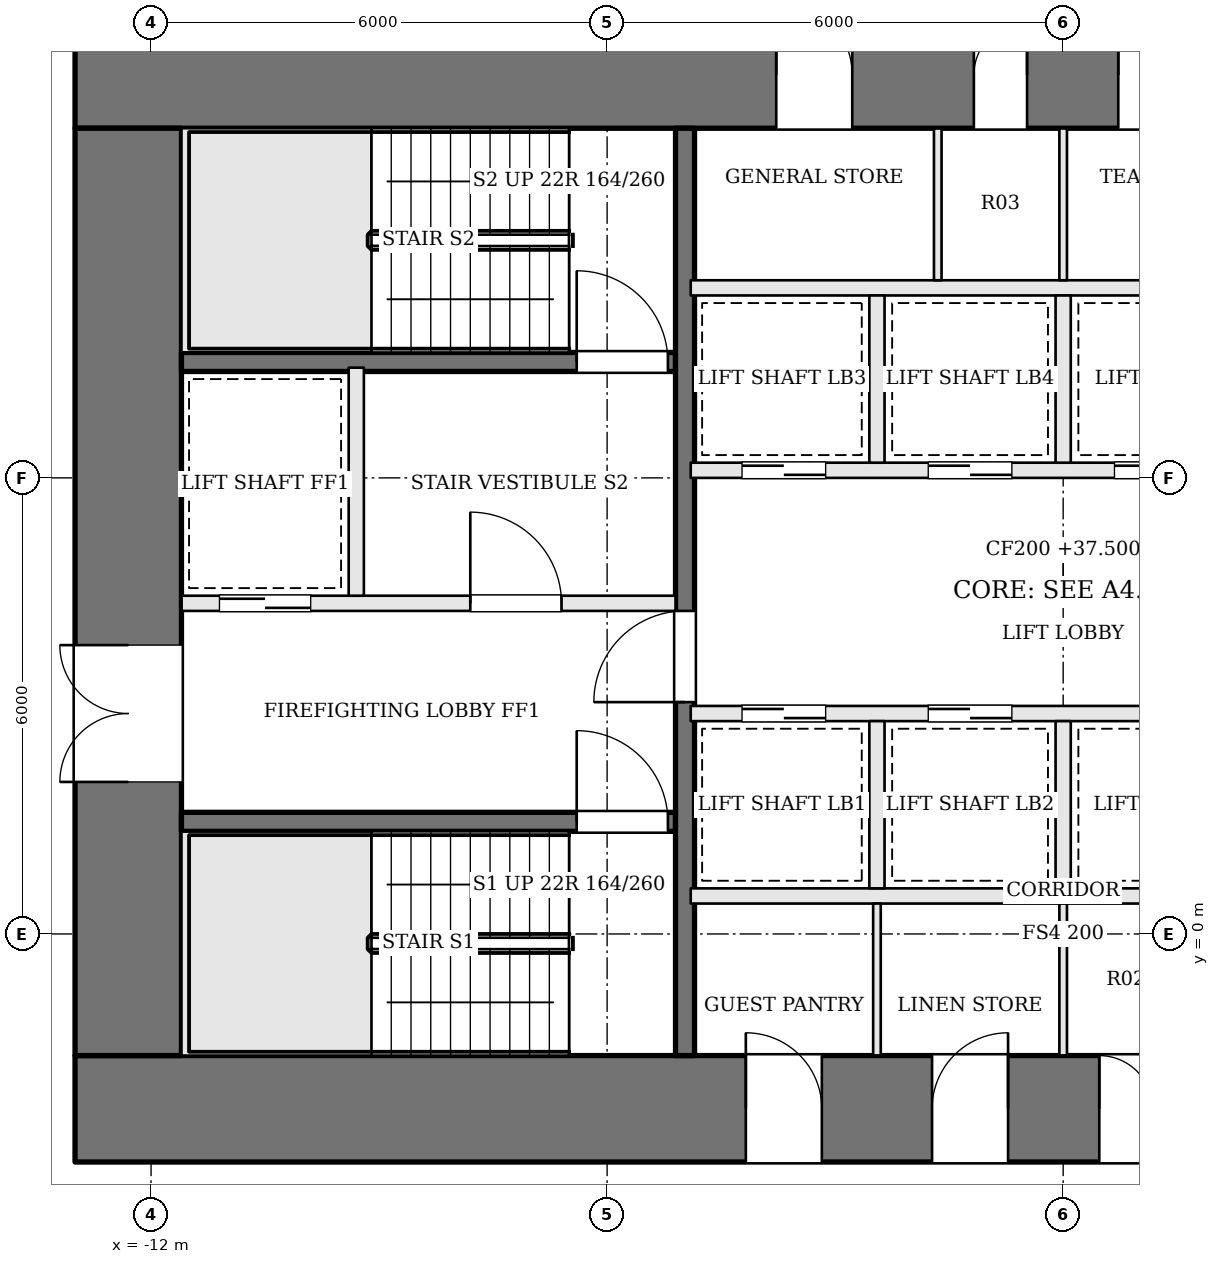
"""IFC4 building model, lengths in metres.
Left out: names, types, materials, properties, quantities, classifications, styles, units other than length and angle.
Written with IfcOpenShell. Run it as: python <this file> out.ifc"""

import sys

from ifc_helpers import new_model, si_unit, direction, frame, frame_2d, origin, place, context, subcontext, project, spatial, rectangle, extrude, element, fill, save


model = new_model("IFC4")
c1 = context("Model", 3, precision=1e-05, world=origin(), true_north=direction((0.0, 1.0)))
c2 = subcontext(c1, "Body", "Model", "MODEL_VIEW")
j1 = project(units=[si_unit("LENGTHUNIT", "METRE"), si_unit("PLANEANGLEUNIT", "RADIAN")], contexts=[c1])
p1 = place(None, origin())
s1 = spatial("IfcSite", under=j1, at=p1, CompositionType="ELEMENT")
p2 = place(p1, origin())
s2 = spatial("IfcBuilding", under=s1, at=p2, CompositionType="ELEMENT")
p3 = place(p2, frame((0.0, 0.0, 37.5)))
s3 = spatial("IfcBuildingStorey", under=s2, at=p3, CompositionType="ELEMENT", Elevation=37.5)
p4 = place(p3, frame((-13.0, 11.3, 0.0), z_axis=(0.0, 0.0, 1.0), x_axis=(1.0, 0.0, 0.0)))
e1 = element("IfcWall", 1, at=p4, inside=s3, PredefinedType="SHEAR", context=c2, shape_type="SweptSolid", body=[
    extrude(rectangle(XDim=26.0, YDim=1.4, at=frame_2d((13.0, 0.0))), origin(), (0.0, 0.0, 1.0), 3.6),
])
p5 = place(p4, frame((9.225, 0.0, 0.0)))
e2 = element("IfcOpeningElement", 2, at=p5, cuts=e1, PredefinedType="OPENING", context=c2, shape_type="SweptSolid", body=[
    extrude(rectangle(XDim=1.0, YDim=2.1, at=frame_2d((0.5, 1.05))), frame((0.0, 0.71, 0.0), z_axis=(0.0, -1.0, 0.0), x_axis=(1.0, 0.0, 0.0)), (0.0, 0.0, 1.0), 1.42),
])
p6 = place(p4, frame((11.825, 0.0, 0.0)))
e3 = element("IfcOpeningElement", 3, at=p6, cuts=e1, PredefinedType="OPENING", context=c2, shape_type="SweptSolid", body=[
    extrude(rectangle(XDim=0.7, YDim=2.1, at=frame_2d((0.35, 1.05))), frame((0.0, 0.71, 0.0), z_axis=(0.0, -1.0, 0.0), x_axis=(1.0, 0.0, 0.0)), (0.0, 0.0, 1.0), 1.42),
])
p7 = place(p4, frame((13.725, 0.0, 0.0)))
e4 = element("IfcOpeningElement", 4, at=p7, cuts=e1, PredefinedType="OPENING", context=c2, shape_type="SweptSolid", body=[
    extrude(rectangle(XDim=1.0, YDim=2.1, at=frame_2d((0.5, 1.05))), frame((0.0, 0.71, 0.0), z_axis=(0.0, -1.0, 0.0), x_axis=(1.0, 0.0, 0.0)), (0.0, 0.0, 1.0), 1.42),
])
p8 = place(p4, frame((16.225, 0.0, 0.0)))
e5 = element("IfcOpeningElement", 5, at=p8, cuts=e1, PredefinedType="OPENING", context=c2, shape_type="SweptSolid", body=[
    extrude(rectangle(XDim=0.9, YDim=2.1, at=frame_2d((0.45, 1.05))), frame((0.0, 0.71, 0.0), z_axis=(0.0, -1.0, 0.0), x_axis=(1.0, 0.0, 0.0)), (0.0, 0.0, 1.0), 1.42),
])
p9 = place(p3, frame((-13.0, -2.3, 0.0), z_axis=(0.0, 0.0, 1.0), x_axis=(1.0, 0.0, 0.0)))
e6 = element("IfcWall", 6, at=p9, inside=s3, PredefinedType="SHEAR", context=c2, shape_type="SweptSolid", body=[
    extrude(rectangle(XDim=26.0, YDim=1.4, at=frame_2d((13.0, 0.0))), origin(), (0.0, 0.0, 1.0), 3.6),
])
p10 = place(p9, frame((8.825, 0.0, 0.0)))
e7 = element("IfcOpeningElement", 7, at=p10, cuts=e6, PredefinedType="OPENING", context=c2, shape_type="SweptSolid", body=[
    extrude(rectangle(XDim=1.0, YDim=2.1, at=frame_2d((0.5, 1.05))), frame((0.0, 0.71, 0.0), z_axis=(0.0, -1.0, 0.0), x_axis=(1.0, 0.0, 0.0)), (0.0, 0.0, 1.0), 1.42),
])
p11 = place(p9, frame((11.275, 0.0, 0.0)))
e8 = element("IfcOpeningElement", 8, at=p11, cuts=e6, PredefinedType="OPENING", context=c2, shape_type="SweptSolid", body=[
    extrude(rectangle(XDim=1.0, YDim=2.1, at=frame_2d((0.5, 1.05))), frame((0.0, 0.71, 0.0), z_axis=(0.0, -1.0, 0.0), x_axis=(1.0, 0.0, 0.0)), (0.0, 0.0, 1.0), 1.42),
])
p12 = place(p9, frame((13.475, 0.0, 0.0)))
e9 = element("IfcOpeningElement", 9, at=p12, cuts=e6, PredefinedType="OPENING", context=c2, shape_type="SweptSolid", body=[
    extrude(rectangle(XDim=0.7, YDim=2.1, at=frame_2d((0.35, 1.05))), frame((0.0, 0.71, 0.0), z_axis=(0.0, -1.0, 0.0), x_axis=(1.0, 0.0, 0.0)), (0.0, 0.0, 1.0), 1.42),
])
p13 = place(p9, frame((15.775, 0.0, 0.0)))
e10 = element("IfcOpeningElement", 10, at=p13, cuts=e6, PredefinedType="OPENING", context=c2, shape_type="SweptSolid", body=[
    extrude(rectangle(XDim=1.0, YDim=2.1, at=frame_2d((0.5, 1.05))), frame((0.0, 0.71, 0.0), z_axis=(0.0, -1.0, 0.0), x_axis=(1.0, 0.0, 0.0)), (0.0, 0.0, 1.0), 1.42),
])
p14 = place(p3, frame((-12.3, -1.6, 0.0), z_axis=(0.0, 0.0, 1.0), x_axis=(0.0, 1.0, 0.0)))
e11 = element("IfcWall", 11, at=p14, inside=s3, PredefinedType="SHEAR", context=c2, shape_type="SweptSolid", body=[
    extrude(rectangle(XDim=12.2, YDim=1.4, at=frame_2d((6.1, 0.0))), origin(), (0.0, 0.0, 1.0), 3.6),
])
p15 = place(p14, frame((3.6, 0.0, 0.0)))
e12 = element("IfcOpeningElement", 12, at=p15, cuts=e11, PredefinedType="OPENING", context=c2, shape_type="SweptSolid", body=[
    extrude(rectangle(XDim=1.8, YDim=2.1, at=frame_2d((0.9, 1.05))), frame((0.0, 0.71, 0.0), z_axis=(0.0, -1.0, 0.0), x_axis=(1.0, 0.0, 0.0)), (0.0, 0.0, 1.0), 1.42),
])
p16 = place(p3, frame((-11.6, 1.475, 0.0), z_axis=(0.0, 0.0, 1.0), x_axis=(1.0, 0.0, 0.0)))
e13 = element("IfcWall", 13, at=p16, inside=s3, PredefinedType="SOLIDWALL", context=c2, shape_type="SweptSolid", body=[
    extrude(rectangle(XDim=6.5, YDim=0.25, at=frame_2d((3.25, 0.0))), origin(), (0.0, 0.0, 1.0), 3.4),
])
p17 = place(p16, frame((5.2, 0.0, 0.0)))
e14 = element("IfcOpeningElement", 14, at=p17, cuts=e13, PredefinedType="OPENING", context=c2, shape_type="SweptSolid", body=[
    extrude(rectangle(XDim=1.2, YDim=2.1, at=frame_2d((0.6, 1.05))), frame((0.0, 0.135, 0.0), z_axis=(0.0, -1.0, 0.0), x_axis=(1.0, 0.0, 0.0)), (0.0, 0.0, 1.0), 0.27),
])
p18 = place(p3, frame((-11.6, 4.35, 0.0), z_axis=(0.0, 0.0, 1.0), x_axis=(1.0, 0.0, 0.0)))
e15 = element("IfcWall", 15, at=p18, inside=s3, PredefinedType="SOLIDWALL", context=c2, shape_type="SweptSolid", body=[
    extrude(rectangle(XDim=6.5, YDim=0.2, at=frame_2d((3.25, 0.0))), origin(), (0.0, 0.0, 1.0), 3.4),
])
p19 = place(p18, frame((3.8, 0.0, 0.0)))
e16 = element("IfcOpeningElement", 16, at=p19, cuts=e15, PredefinedType="OPENING", context=c2, shape_type="SweptSolid", body=[
    extrude(rectangle(XDim=1.2, YDim=2.1, at=frame_2d((0.6, 1.05))), frame((0.0, 0.11, 0.0), z_axis=(0.0, -1.0, 0.0), x_axis=(1.0, 0.0, 0.0)), (0.0, 0.0, 1.0), 0.22),
])
p20 = place(p18, frame((0.5, 0.0, 0.0)))
e17 = element("IfcOpeningElement", 17, at=p20, cuts=e15, PredefinedType="OPENING", context=c2, shape_type="SweptSolid", body=[
    extrude(rectangle(XDim=1.2, YDim=2.1, at=frame_2d((0.6, 1.05))), frame((0.0, 0.11, 0.0), z_axis=(0.0, -1.0, 0.0), x_axis=(1.0, 0.0, 0.0)), (0.0, 0.0, 1.0), 0.22),
])
p21 = place(p3, frame((-11.6, 7.525, 0.0), z_axis=(0.0, 0.0, 1.0), x_axis=(1.0, 0.0, 0.0)))
e18 = element("IfcWall", 18, at=p21, inside=s3, PredefinedType="SOLIDWALL", context=c2, shape_type="SweptSolid", body=[
    extrude(rectangle(XDim=6.5, YDim=0.25, at=frame_2d((3.25, 0.0))), origin(), (0.0, 0.0, 1.0), 3.4),
])
p22 = place(p21, frame((5.2, 0.0, 0.0)))
e19 = element("IfcOpeningElement", 19, at=p22, cuts=e18, PredefinedType="OPENING", context=c2, shape_type="SweptSolid", body=[
    extrude(rectangle(XDim=1.2, YDim=2.1, at=frame_2d((0.6, 1.05))), frame((0.0, 0.135, 0.0), z_axis=(0.0, -1.0, 0.0), x_axis=(1.0, 0.0, 0.0)), (0.0, 0.0, 1.0), 0.27),
])
p23 = place(p3, frame((-9.3, 4.45, 0.0), z_axis=(0.0, 0.0, 1.0), x_axis=(0.0, 1.0, 0.0)))
e20 = element("IfcWall", 20, at=p23, inside=s3, PredefinedType="SOLIDWALL", context=c2, shape_type="SweptSolid", body=[
    extrude(rectangle(XDim=3.0, YDim=0.2, at=frame_2d((1.5, 0.0))), origin(), (0.0, 0.0, 1.0), 3.4),
])
p24 = place(p3, frame((-4.975, -1.6, 0.0), z_axis=(0.0, 0.0, 1.0), x_axis=(0.0, 1.0, 0.0)))
e21 = element("IfcWall", 21, at=p24, inside=s3, PredefinedType="SOLIDWALL", context=c2, shape_type="SweptSolid", body=[
    extrude(rectangle(XDim=12.2, YDim=0.25, at=frame_2d((6.1, 0.0))), origin(), (0.0, 0.0, 1.0), 3.4),
])
p25 = place(p24, frame((4.65, 0.0, 0.0)))
e22 = element("IfcOpeningElement", 22, at=p25, cuts=e21, PredefinedType="OPENING", context=c2, shape_type="SweptSolid", body=[
    extrude(rectangle(XDim=1.2, YDim=2.1, at=frame_2d((0.6, 1.05))), frame((0.0, 0.135, 0.0), z_axis=(0.0, -1.0, 0.0), x_axis=(1.0, 0.0, 0.0)), (0.0, 0.0, 1.0), 0.27),
])
p26 = place(p3, frame((-4.9, 0.5, 0.0), z_axis=(0.0, 0.0, 1.0), x_axis=(1.0, 0.0, 0.0)))
e23 = element("IfcWall", 23, at=p26, inside=s3, PredefinedType="SOLIDWALL", context=c2, shape_type="SweptSolid", body=[
    extrude(rectangle(XDim=9.8, YDim=0.2, at=frame_2d((4.9, 0.0))), origin(), (0.0, 0.0, 1.0), 3.4),
])
p27 = place(p3, frame((-4.9, 2.9, 0.0), z_axis=(0.0, 0.0, 1.0), x_axis=(1.0, 0.0, 0.0)))
e24 = element("IfcWall", 24, at=p27, inside=s3, PredefinedType="SOLIDWALL", context=c2, shape_type="SweptSolid", body=[
    extrude(rectangle(XDim=9.8, YDim=0.2, at=frame_2d((4.9, 0.0))), origin(), (0.0, 0.0, 1.0), 3.4),
])
p28 = place(p27, frame((0.675, 0.0, 0.0)))
e25 = element("IfcOpeningElement", 25, at=p28, cuts=e24, PredefinedType="OPENING", context=c2, shape_type="SweptSolid", body=[
    extrude(rectangle(XDim=1.1, YDim=2.1, at=frame_2d((0.55, 1.05))), frame((0.0, 0.11, 0.0), z_axis=(0.0, -1.0, 0.0), x_axis=(1.0, 0.0, 0.0)), (0.0, 0.0, 1.0), 0.22),
])
p29 = place(p27, frame((3.125, 0.0, 0.0)))
e26 = element("IfcOpeningElement", 26, at=p29, cuts=e24, PredefinedType="OPENING", context=c2, shape_type="SweptSolid", body=[
    extrude(rectangle(XDim=1.1, YDim=2.1, at=frame_2d((0.55, 1.05))), frame((0.0, 0.11, 0.0), z_axis=(0.0, -1.0, 0.0), x_axis=(1.0, 0.0, 0.0)), (0.0, 0.0, 1.0), 0.22),
])
p30 = place(p3, frame((-4.9, 6.1, 0.0), z_axis=(0.0, 0.0, 1.0), x_axis=(1.0, 0.0, 0.0)))
e27 = element("IfcWall", 27, at=p30, inside=s3, PredefinedType="SOLIDWALL", context=c2, shape_type="SweptSolid", body=[
    extrude(rectangle(XDim=9.8, YDim=0.2, at=frame_2d((4.9, 0.0))), origin(), (0.0, 0.0, 1.0), 3.4),
])
p31 = place(p30, frame((0.675, 0.0, 0.0)))
e28 = element("IfcOpeningElement", 28, at=p31, cuts=e27, PredefinedType="OPENING", context=c2, shape_type="SweptSolid", body=[
    extrude(rectangle(XDim=1.1, YDim=2.1, at=frame_2d((0.55, 1.05))), frame((0.0, 0.11, 0.0), z_axis=(0.0, -1.0, 0.0), x_axis=(1.0, 0.0, 0.0)), (0.0, 0.0, 1.0), 0.22),
])
p32 = place(p30, frame((3.125, 0.0, 0.0)))
e29 = element("IfcOpeningElement", 29, at=p32, cuts=e27, PredefinedType="OPENING", context=c2, shape_type="SweptSolid", body=[
    extrude(rectangle(XDim=1.1, YDim=2.1, at=frame_2d((0.55, 1.05))), frame((0.0, 0.11, 0.0), z_axis=(0.0, -1.0, 0.0), x_axis=(1.0, 0.0, 0.0)), (0.0, 0.0, 1.0), 0.22),
])
p33 = place(p30, frame((5.575, 0.0, 0.0)))
e30 = element("IfcOpeningElement", 30, at=p33, cuts=e27, PredefinedType="OPENING", context=c2, shape_type="SweptSolid", body=[
    extrude(rectangle(XDim=1.1, YDim=2.1, at=frame_2d((0.55, 1.05))), frame((0.0, 0.11, 0.0), z_axis=(0.0, -1.0, 0.0), x_axis=(1.0, 0.0, 0.0)), (0.0, 0.0, 1.0), 0.22),
])
p34 = place(p30, frame((8.025, 0.0, 0.0)))
e31 = element("IfcOpeningElement", 31, at=p34, cuts=e27, PredefinedType="OPENING", context=c2, shape_type="SweptSolid", body=[
    extrude(rectangle(XDim=1.1, YDim=2.1, at=frame_2d((0.55, 1.05))), frame((0.0, 0.11, 0.0), z_axis=(0.0, -1.0, 0.0), x_axis=(1.0, 0.0, 0.0)), (0.0, 0.0, 1.0), 0.22),
])
p35 = place(p3, frame((-4.9, 8.5, 0.0), z_axis=(0.0, 0.0, 1.0), x_axis=(1.0, 0.0, 0.0)))
e32 = element("IfcWall", 32, at=p35, inside=s3, PredefinedType="SOLIDWALL", context=c2, shape_type="SweptSolid", body=[
    extrude(rectangle(XDim=9.8, YDim=0.2, at=frame_2d((4.9, 0.0))), origin(), (0.0, 0.0, 1.0), 3.4),
])
for number, where, z_axis, x_axis in (
    (33, (-2.45, 0.6, 0.0), (0.0, 0.0, 1.0), (0.0, 1.0, 0.0)),
    (34, (0.0, 0.6, 0.0), (0.0, 0.0, 1.0), (0.0, 1.0, 0.0)),
    (35, (-2.45, 6.2, 0.0), (0.0, 0.0, 1.0), (0.0, 1.0, 0.0)),
    (36, (0.0, 6.2, 0.0), (0.0, 0.0, 1.0), (0.0, 1.0, 0.0)),
):
    element("IfcWall", number, at=place(p3, frame(where, z_axis=z_axis, x_axis=x_axis)), inside=s3, PredefinedType="SOLIDWALL", context=c2, shape_type="SweptSolid", body=[
        extrude(rectangle(XDim=2.2, YDim=0.2, at=frame_2d((1.1, 0.0))), origin(), (0.0, 0.0, 1.0), 3.4),
    ])
for number, where, z_axis, x_axis in (
    (37, (-2.45, -1.6, 0.0), (0.0, 0.0, 1.0), (0.0, 1.0, 0.0)),
    (38, (0.0, -1.6, 0.0), (0.0, 0.0, 1.0), (0.0, 1.0, 0.0)),
    (39, (-1.65, 8.6, 0.0), (0.0, 0.0, 1.0), (0.0, 1.0, 0.0)),
    (40, (0.0, 8.6, 0.0), (0.0, 0.0, 1.0), (0.0, 1.0, 0.0)),
):
    element("IfcWall", number, at=place(p3, frame(where, z_axis=z_axis, x_axis=x_axis)), inside=s3, PredefinedType="PARTITIONING", context=c2, shape_type="SweptSolid", body=[
        extrude(rectangle(XDim=2.0, YDim=0.1, at=frame_2d((1.0, 0.0))), origin(), (0.0, 0.0, 1.0), 3.4),
    ])
p36 = place(p15, origin())
e41 = element("IfcDoor", 41, at=p36, inside=s3, OperationType="DOUBLE_DOOR_SINGLE_SWING", PredefinedType="DOOR", context=c2, shape_type="SweptSolid", body=[
    extrude(rectangle(XDim=1.8, YDim=2.1, at=frame_2d((0.9, 1.05))), frame((0.0, 0.025, 0.0), z_axis=(0.0, -1.0, 0.0), x_axis=(1.0, 0.0, 0.0)), (0.0, 0.0, 1.0), 0.05),
])
fill(e12, e41)
p37 = place(p25, origin())
e42 = element("IfcDoor", 42, at=p37, inside=s3, OperationType="SINGLE_SWING_LEFT", PredefinedType="DOOR", context=c2, shape_type="SweptSolid", body=[
    extrude(rectangle(XDim=1.2, YDim=2.1, at=frame_2d((0.6, 1.05))), frame((0.0, 0.025, 0.0), z_axis=(0.0, -1.0, 0.0), x_axis=(1.0, 0.0, 0.0)), (0.0, 0.0, 1.0), 0.05),
])
fill(e22, e42)
p38 = place(p19, origin())
e43 = element("IfcDoor", 43, at=p38, inside=s3, OperationType="SINGLE_SWING_LEFT", PredefinedType="DOOR", context=c2, shape_type="SweptSolid", body=[
    extrude(rectangle(XDim=1.2, YDim=2.1, at=frame_2d((0.6, 1.05))), frame((0.0, 0.025, 0.0), z_axis=(0.0, -1.0, 0.0), x_axis=(1.0, 0.0, 0.0)), (0.0, 0.0, 1.0), 0.05),
])
fill(e16, e43)
p39 = place(p17, origin())
e44 = element("IfcDoor", 44, at=p39, inside=s3, OperationType="SINGLE_SWING_LEFT", PredefinedType="DOOR", context=c2, shape_type="SweptSolid", body=[
    extrude(rectangle(XDim=1.2, YDim=2.1, at=frame_2d((0.6, 1.05))), frame((0.0, 0.025, 0.0), z_axis=(0.0, -1.0, 0.0), x_axis=(1.0, 0.0, 0.0)), (0.0, 0.0, 1.0), 0.05),
])
fill(e14, e44)
p40 = place(p22, origin())
e45 = element("IfcDoor", 45, at=p40, inside=s3, OperationType="SINGLE_SWING_LEFT", PredefinedType="DOOR", context=c2, shape_type="SweptSolid", body=[
    extrude(rectangle(XDim=1.2, YDim=2.1, at=frame_2d((0.6, 1.05))), frame((0.0, 0.025, 0.0), z_axis=(0.0, -1.0, 0.0), x_axis=(1.0, 0.0, 0.0)), (0.0, 0.0, 1.0), 0.05),
])
fill(e19, e45)
p41 = place(p20, origin())
e46 = element("IfcDoor", 46, at=p41, inside=s3, OperationType="SLIDING_TO_RIGHT", PredefinedType="DOOR", context=c2, shape_type="SweptSolid", body=[
    extrude(rectangle(XDim=1.2, YDim=2.1, at=frame_2d((0.6, 1.05))), frame((0.0, 0.025, 0.0), z_axis=(0.0, -1.0, 0.0), x_axis=(1.0, 0.0, 0.0)), (0.0, 0.0, 1.0), 0.05),
])
fill(e17, e46)
p42 = place(p28, origin())
e47 = element("IfcDoor", 47, at=p42, inside=s3, OperationType="SLIDING_TO_RIGHT", PredefinedType="DOOR", context=c2, shape_type="SweptSolid", body=[
    extrude(rectangle(XDim=1.1, YDim=2.1, at=frame_2d((0.55, 1.05))), frame((0.0, 0.025, 0.0), z_axis=(0.0, -1.0, 0.0), x_axis=(1.0, 0.0, 0.0)), (0.0, 0.0, 1.0), 0.05),
])
fill(e25, e47)
p43 = place(p29, origin())
e48 = element("IfcDoor", 48, at=p43, inside=s3, OperationType="SLIDING_TO_LEFT", PredefinedType="DOOR", context=c2, shape_type="SweptSolid", body=[
    extrude(rectangle(XDim=1.1, YDim=2.1, at=frame_2d((0.55, 1.05))), frame((0.0, 0.025, 0.0), z_axis=(0.0, -1.0, 0.0), x_axis=(1.0, 0.0, 0.0)), (0.0, 0.0, 1.0), 0.05),
])
fill(e26, e48)
p44 = place(p31, origin())
e49 = element("IfcDoor", 49, at=p44, inside=s3, OperationType="SLIDING_TO_RIGHT", PredefinedType="DOOR", context=c2, shape_type="SweptSolid", body=[
    extrude(rectangle(XDim=1.1, YDim=2.1, at=frame_2d((0.55, 1.05))), frame((0.0, 0.025, 0.0), z_axis=(0.0, -1.0, 0.0), x_axis=(1.0, 0.0, 0.0)), (0.0, 0.0, 1.0), 0.05),
])
fill(e28, e49)
p45 = place(p32, origin())
e50 = element("IfcDoor", 50, at=p45, inside=s3, OperationType="SLIDING_TO_LEFT", PredefinedType="DOOR", context=c2, shape_type="SweptSolid", body=[
    extrude(rectangle(XDim=1.1, YDim=2.1, at=frame_2d((0.55, 1.05))), frame((0.0, 0.025, 0.0), z_axis=(0.0, -1.0, 0.0), x_axis=(1.0, 0.0, 0.0)), (0.0, 0.0, 1.0), 0.05),
])
fill(e29, e50)
p46 = place(p33, origin())
e51 = element("IfcDoor", 51, at=p46, inside=s3, OperationType="SLIDING_TO_RIGHT", PredefinedType="DOOR", context=c2, shape_type="SweptSolid", body=[
    extrude(rectangle(XDim=1.1, YDim=2.1, at=frame_2d((0.55, 1.05))), frame((0.0, 0.025, 0.0), z_axis=(0.0, -1.0, 0.0), x_axis=(1.0, 0.0, 0.0)), (0.0, 0.0, 1.0), 0.05),
])
fill(e30, e51)
p47 = place(p10, origin())
e52 = element("IfcDoor", 52, at=p47, inside=s3, OperationType="SINGLE_SWING_LEFT", PredefinedType="DOOR", context=c2, shape_type="SweptSolid", body=[
    extrude(rectangle(XDim=1.0, YDim=2.1, at=frame_2d((0.5, 1.05))), frame((0.0, 0.025, 0.0), z_axis=(0.0, -1.0, 0.0), x_axis=(1.0, 0.0, 0.0)), (0.0, 0.0, 1.0), 0.05),
])
fill(e7, e52)
p48 = place(p11, origin())
e53 = element("IfcDoor", 53, at=p48, inside=s3, OperationType="SINGLE_SWING_RIGHT", PredefinedType="DOOR", context=c2, shape_type="SweptSolid", body=[
    extrude(rectangle(XDim=1.0, YDim=2.1, at=frame_2d((0.5, 1.05))), frame((0.0, 0.025, 0.0), z_axis=(0.0, -1.0, 0.0), x_axis=(1.0, 0.0, 0.0)), (0.0, 0.0, 1.0), 0.05),
])
fill(e8, e53)
p49 = place(p12, origin())
e54 = element("IfcDoor", 54, at=p49, inside=s3, OperationType="SINGLE_SWING_LEFT", PredefinedType="DOOR", context=c2, shape_type="SweptSolid", body=[
    extrude(rectangle(XDim=0.7, YDim=2.1, at=frame_2d((0.35, 1.05))), frame((0.0, 0.025, 0.0), z_axis=(0.0, -1.0, 0.0), x_axis=(1.0, 0.0, 0.0)), (0.0, 0.0, 1.0), 0.05),
])
fill(e9, e54)
p50 = place(p5, origin())
e55 = element("IfcDoor", 55, at=p50, inside=s3, OperationType="SINGLE_SWING_LEFT", PredefinedType="DOOR", context=c2, shape_type="SweptSolid", body=[
    extrude(rectangle(XDim=1.0, YDim=2.1, at=frame_2d((0.5, 1.05))), frame((0.0, 0.025, 0.0), z_axis=(0.0, -1.0, 0.0), x_axis=(1.0, 0.0, 0.0)), (0.0, 0.0, 1.0), 0.05),
])
fill(e2, e55)
p51 = place(p6, origin())
e56 = element("IfcDoor", 56, at=p51, inside=s3, OperationType="SINGLE_SWING_RIGHT", PredefinedType="DOOR", context=c2, shape_type="SweptSolid", body=[
    extrude(rectangle(XDim=0.7, YDim=2.1, at=frame_2d((0.35, 1.05))), frame((0.0, 0.025, 0.0), z_axis=(0.0, -1.0, 0.0), x_axis=(1.0, 0.0, 0.0)), (0.0, 0.0, 1.0), 0.05),
])
fill(e3, e56)
p52 = place(p7, origin())
e57 = element("IfcDoor", 57, at=p52, inside=s3, OperationType="SINGLE_SWING_LEFT", PredefinedType="DOOR", context=c2, shape_type="SweptSolid", body=[
    extrude(rectangle(XDim=1.0, YDim=2.1, at=frame_2d((0.5, 1.05))), frame((0.0, 0.025, 0.0), z_axis=(0.0, -1.0, 0.0), x_axis=(1.0, 0.0, 0.0)), (0.0, 0.0, 1.0), 0.05),
])
fill(e4, e57)
save(model, sys.argv[1])
